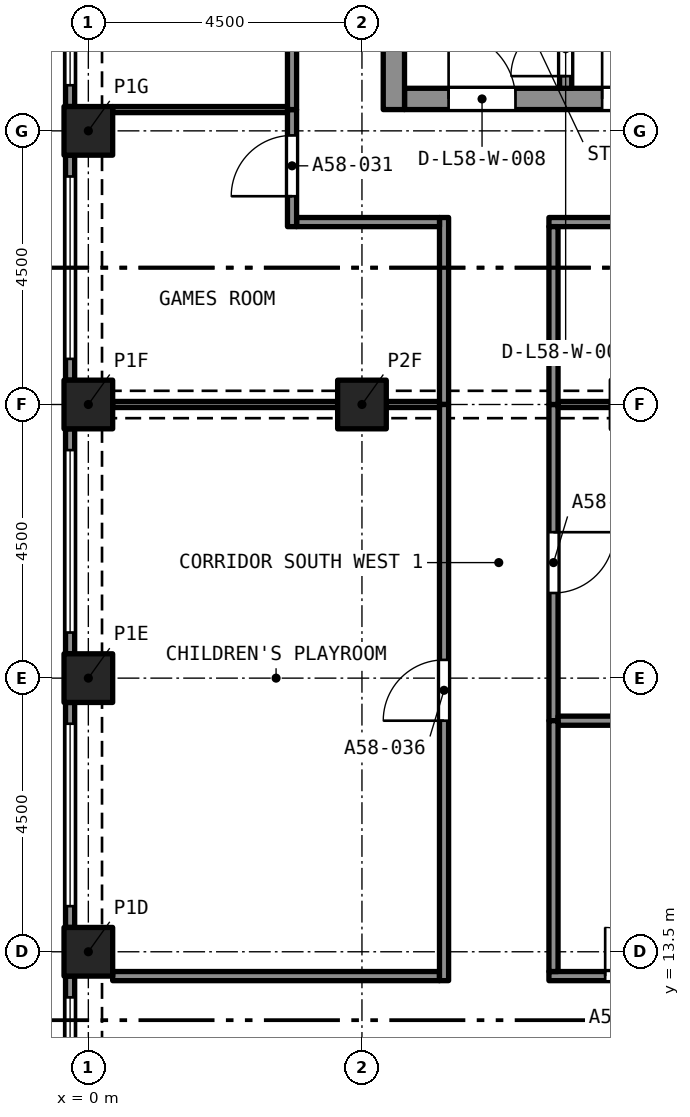
"""IFC4 building model, lengths in metres.
Left out: names, types, materials, properties, quantities, classifications, styles, units other than length and angle.
Written with IfcOpenShell. Run it as: python <this file> out.ifc"""

import sys

from ifc_helpers import new_model, si_unit, direction, frame, frame_2d, origin, origin_2d, place, context, subcontext, project, spatial, rectangle, extrude, element, fill, save


model = new_model("IFC4")
c1 = context("Model", 3, precision=1e-05, world=origin(), true_north=direction((0.0, 1.0)))
c2 = subcontext(c1, "Body", "Model", "MODEL_VIEW")
j1 = project(units=[si_unit("LENGTHUNIT", "METRE"), si_unit("PLANEANGLEUNIT", "RADIAN")], contexts=[c1])
p1 = place(None, origin())
s1 = spatial("IfcSite", under=j1, at=p1, CompositionType="ELEMENT")
p2 = place(p1, origin())
s2 = spatial("IfcBuilding", under=s1, at=p2, CompositionType="ELEMENT")
p3 = place(p2, frame((0.0, 0.0, 210.095)))
s3 = spatial("IfcBuildingStorey", under=s2, at=p3, CompositionType="ELEMENT", Elevation=210.095)
for number, where, z_axis, x_axis in (
    (1, (0.0, 13.5, 0.0), (0.0, 0.0, 1.0), (1.0, 0.0, 0.0)),
    (2, (0.0, 18.0, 0.0), (0.0, 0.0, 1.0), (1.0, 0.0, 0.0)),
    (3, (0.0, 22.5, 0.0), (0.0, 0.0, 1.0), (1.0, 0.0, 0.0)),
    (4, (4.5, 22.5, 0.0), (0.0, 0.0, 1.0), (1.0, 0.0, 0.0)),
    (5, (0.0, 27.0, 0.0), (0.0, 0.0, 1.0), (1.0, 0.0, 0.0)),
):
    element("IfcColumn", number, at=place(p3, frame(where, z_axis=z_axis, x_axis=x_axis)), inside=s3, PredefinedType="COLUMN", context=c2, shape_type="SweptSolid", body=[
        extrude(rectangle(XDim=0.8, YDim=0.8, at=origin_2d()), origin(), (0.0, 0.0, 1.0), 3.2),
    ])
p4 = place(p3, frame((5.2, 27.525, 0.0), z_axis=(0.0, 0.0, 1.0), x_axis=(1.0, 0.0, 0.0)))
e6 = element("IfcWall", 6, at=p4, inside=s3, PredefinedType="SOLIDWALL", context=c2, shape_type="SweptSolid", body=[
    extrude(rectangle(XDim=7.6, YDim=0.35, at=frame_2d((3.8, 0.0))), origin(), (0.0, 0.0, 1.0), 3.2),
])
p5 = place(p4, frame((0.725, 0.0, 0.0)))
e7 = element("IfcOpeningElement", 7, at=p5, cuts=e6, PredefinedType="OPENING", context=c2, shape_type="SweptSolid", body=[
    extrude(rectangle(XDim=1.1, YDim=2.1, at=frame_2d((0.55, 1.05))), frame((0.0, 0.185, 0.0), z_axis=(0.0, -1.0, 0.0), x_axis=(1.0, 0.0, 0.0)), (0.0, 0.0, 1.0), 0.37),
])
p6 = place(p4, frame((3.25, 0.0, 0.0)))
e8 = element("IfcOpeningElement", 8, at=p6, cuts=e6, PredefinedType="OPENING", context=c2, shape_type="SweptSolid", body=[
    extrude(rectangle(XDim=1.1, YDim=2.1, at=frame_2d((0.55, 1.05))), frame((0.0, 0.185, 0.0), z_axis=(0.0, -1.0, 0.0), x_axis=(1.0, 0.0, 0.0)), (0.0, 0.0, 1.0), 0.37),
])
p7 = place(p4, frame((5.775, 0.0, 0.0)))
e9 = element("IfcOpeningElement", 9, at=p7, cuts=e6, PredefinedType="OPENING", context=c2, shape_type="SweptSolid", body=[
    extrude(rectangle(XDim=1.1, YDim=2.1, at=frame_2d((0.55, 1.05))), frame((0.0, 0.185, 0.0), z_axis=(0.0, -1.0, 0.0), x_axis=(1.0, 0.0, 0.0)), (0.0, 0.0, 1.0), 0.37),
])
p8 = place(p3, frame((5.025, 27.35, 0.0), z_axis=(0.0, 0.0, 1.0), x_axis=(0.0, 1.0, 0.0)))
e10 = element("IfcWall", 10, at=p8, inside=s3, PredefinedType="SOLIDWALL", context=c2, shape_type="SweptSolid", body=[
    extrude(rectangle(XDim=12.8, YDim=0.35, at=frame_2d((6.4, 0.0))), origin(), (0.0, 0.0, 1.0), 3.2),
])
p9 = place(p8, frame((8.6, 0.0, 0.0)))
e11 = element("IfcOpeningElement", 11, at=p9, cuts=e10, PredefinedType="OPENING", context=c2, shape_type="SweptSolid", body=[
    extrude(rectangle(XDim=1.2, YDim=2.1, at=frame_2d((0.6, 1.05))), frame((0.0, 0.185, 0.0), z_axis=(0.0, -1.0, 0.0), x_axis=(1.0, 0.0, 0.0)), (0.0, 0.0, 1.0), 0.37),
])
p10 = place(p3, frame((-0.3, 27.4, 0.0), z_axis=(0.0, 0.0, 1.0), x_axis=(0.0, 1.0, 0.0)))
e12 = element("IfcWall", 12, at=p10, inside=s3, PredefinedType="SOLIDWALL", context=c2, shape_type="SweptSolid", body=[
    extrude(rectangle(XDim=3.7, YDim=0.15, at=frame_2d((1.85, 0.0))), origin(), (0.0, 0.0, 1.0), 3.2),
])
p11 = place(p10, frame((0.35, 0.0, 0.45)))
e13 = element("IfcOpeningElement", 13, at=p11, cuts=e12, PredefinedType="OPENING", context=c2, shape_type="SweptSolid", body=[
    extrude(rectangle(XDim=3.0, YDim=1.95, at=frame_2d((1.5, 0.975))), frame((0.0, 0.085, 0.0), z_axis=(0.0, -1.0, 0.0), x_axis=(1.0, 0.0, 0.0)), (0.0, 0.0, 1.0), 0.17),
])
p12 = place(p3, frame((-0.3, 22.9, 0.0), z_axis=(0.0, 0.0, 1.0), x_axis=(0.0, 1.0, 0.0)))
e14 = element("IfcWall", 14, at=p12, inside=s3, PredefinedType="SOLIDWALL", context=c2, shape_type="SweptSolid", body=[
    extrude(rectangle(XDim=3.7, YDim=0.15, at=frame_2d((1.85, 0.0))), origin(), (0.0, 0.0, 1.0), 3.2),
])
p13 = place(p12, frame((0.35, 0.0, 0.45)))
e15 = element("IfcOpeningElement", 15, at=p13, cuts=e14, PredefinedType="OPENING", context=c2, shape_type="SweptSolid", body=[
    extrude(rectangle(XDim=3.0, YDim=1.95, at=frame_2d((1.5, 0.975))), frame((0.0, 0.085, 0.0), z_axis=(0.0, -1.0, 0.0), x_axis=(1.0, 0.0, 0.0)), (0.0, 0.0, 1.0), 0.17),
])
p14 = place(p3, frame((-0.3, 18.4, 0.0), z_axis=(0.0, 0.0, 1.0), x_axis=(0.0, 1.0, 0.0)))
e16 = element("IfcWall", 16, at=p14, inside=s3, PredefinedType="SOLIDWALL", context=c2, shape_type="SweptSolid", body=[
    extrude(rectangle(XDim=3.7, YDim=0.15, at=frame_2d((1.85, 0.0))), origin(), (0.0, 0.0, 1.0), 3.2),
])
p15 = place(p14, frame((0.35, 0.0, 0.45)))
e17 = element("IfcOpeningElement", 17, at=p15, cuts=e16, PredefinedType="OPENING", context=c2, shape_type="SweptSolid", body=[
    extrude(rectangle(XDim=3.0, YDim=1.95, at=frame_2d((1.5, 0.975))), frame((0.0, 0.085, 0.0), z_axis=(0.0, -1.0, 0.0), x_axis=(1.0, 0.0, 0.0)), (0.0, 0.0, 1.0), 0.17),
])
p16 = place(p3, frame((-0.3, 13.9, 0.0), z_axis=(0.0, 0.0, 1.0), x_axis=(0.0, 1.0, 0.0)))
e18 = element("IfcWall", 18, at=p16, inside=s3, PredefinedType="SOLIDWALL", context=c2, shape_type="SweptSolid", body=[
    extrude(rectangle(XDim=3.7, YDim=0.15, at=frame_2d((1.85, 0.0))), origin(), (0.0, 0.0, 1.0), 3.2),
])
p17 = place(p16, frame((0.35, 0.0, 0.45)))
e19 = element("IfcOpeningElement", 19, at=p17, cuts=e18, PredefinedType="OPENING", context=c2, shape_type="SweptSolid", body=[
    extrude(rectangle(XDim=3.0, YDim=1.95, at=frame_2d((1.5, 0.975))), frame((0.0, 0.085, 0.0), z_axis=(0.0, -1.0, 0.0), x_axis=(1.0, 0.0, 0.0)), (0.0, 0.0, 1.0), 0.17),
])
p18 = place(p3, frame((-0.3, 9.4, 0.0), z_axis=(0.0, 0.0, 1.0), x_axis=(0.0, 1.0, 0.0)))
e20 = element("IfcWall", 20, at=p18, inside=s3, PredefinedType="SOLIDWALL", context=c2, shape_type="SweptSolid", body=[
    extrude(rectangle(XDim=3.7, YDim=0.15, at=frame_2d((1.85, 0.0))), origin(), (0.0, 0.0, 1.0), 3.2),
])
p19 = place(p18, frame((0.35, 0.0, 0.45)))
e21 = element("IfcOpeningElement", 21, at=p19, cuts=e20, PredefinedType="OPENING", context=c2, shape_type="SweptSolid", body=[
    extrude(rectangle(XDim=3.0, YDim=1.95, at=frame_2d((1.5, 0.975))), frame((0.0, 0.085, 0.0), z_axis=(0.0, -1.0, 0.0), x_axis=(1.0, 0.0, 0.0)), (0.0, 0.0, 1.0), 0.17),
])
p20 = place(p3, frame((7.65, 22.5, 0.0), z_axis=(0.0, 0.0, 1.0), x_axis=(0.0, -1.0, 0.0)))
e22 = element("IfcWall", 22, at=p20, inside=s3, PredefinedType="PARTITIONING", context=c2, shape_type="SweptSolid", body=[
    extrude(rectangle(XDim=5.2, YDim=0.15, at=frame_2d((2.6, 0.0))), origin(), (0.0, 0.0, 1.0), 2.9),
])
p21 = place(p20, frame((2.1, 0.0, 0.0)))
e23 = element("IfcOpeningElement", 23, at=p21, cuts=e22, PredefinedType="OPENING", context=c2, shape_type="SweptSolid", body=[
    extrude(rectangle(XDim=1.0, YDim=2.1, at=frame_2d((0.5, 1.05))), frame((0.0, 0.085, 0.0), z_axis=(0.0, -1.0, 0.0), x_axis=(1.0, 0.0, 0.0)), (0.0, 0.0, 1.0), 0.17),
])
p22 = place(p3, frame((7.725, 22.5, 0.0), z_axis=(0.0, 0.0, 1.0), x_axis=(1.0, 0.0, 0.0)))
e24 = element("IfcWall", 24, at=p22, inside=s3, PredefinedType="PARTITIONING", context=c2, shape_type="SweptSolid", body=[
    extrude(rectangle(XDim=0.875, YDim=0.1, at=frame_2d((0.438, 0.0))), origin(), (0.0, 0.0, 1.0), 2.38),
])
p23 = place(p3, frame((7.725, 17.3, 0.0), z_axis=(0.0, 0.0, 1.0), x_axis=(1.0, 0.0, 0.0)))
e25 = element("IfcWall", 25, at=p23, inside=s3, PredefinedType="PARTITIONING", context=c2, shape_type="SweptSolid", body=[
    extrude(rectangle(XDim=10.2, YDim=0.15, at=frame_2d((5.1, 0.0))), origin(), (0.0, 0.0, 1.0), 2.9),
])
p24 = place(p3, frame((7.575, 13.1, 0.0), z_axis=(0.0, 0.0, 1.0), x_axis=(1.0, 0.0, 0.0)))
e26 = element("IfcWall", 26, at=p24, inside=s3, PredefinedType="PARTITIONING", context=c2, shape_type="SweptSolid", body=[
    extrude(rectangle(XDim=2.575, YDim=0.15, at=frame_2d((1.288, 0.0))), origin(), (0.0, 0.0, 1.0), 2.9),
])
p25 = place(p24, frame((0.925, 0.0, 0.0)))
e27 = element("IfcOpeningElement", 27, at=p25, cuts=e26, PredefinedType="OPENING", context=c2, shape_type="SweptSolid", body=[
    extrude(rectangle(XDim=0.8, YDim=2.1, at=frame_2d((0.4, 1.05))), frame((0.0, 0.085, 0.0), z_axis=(0.0, -1.0, 0.0), x_axis=(1.0, 0.0, 0.0)), (0.0, 0.0, 1.0), 0.17),
])
p26 = place(p3, frame((0.4, 13.1, 0.0), z_axis=(0.0, 0.0, 1.0), x_axis=(1.0, 0.0, 0.0)))
e28 = element("IfcWall", 28, at=p26, inside=s3, PredefinedType="PARTITIONING", context=c2, shape_type="SweptSolid", body=[
    extrude(rectangle(XDim=5.375, YDim=0.15, at=frame_2d((2.688, 0.0))), origin(), (0.0, 0.0, 1.0), 2.9),
])
p27 = place(p3, frame((5.85, 22.5, 0.0), z_axis=(0.0, 0.0, 1.0), x_axis=(0.0, 1.0, 0.0)))
e29 = element("IfcWall", 29, at=p27, inside=s3, PredefinedType="PARTITIONING", context=c2, shape_type="SweptSolid", body=[
    extrude(rectangle(XDim=3.075, YDim=0.15, at=frame_2d((1.538, 0.0))), origin(), (0.0, 0.0, 1.0), 2.9),
])
p28 = place(p3, frame((3.425, 25.5, 0.0), z_axis=(0.0, 0.0, 1.0), x_axis=(1.0, 0.0, 0.0)))
e30 = element("IfcWall", 30, at=p28, inside=s3, PredefinedType="PARTITIONING", context=c2, shape_type="SweptSolid", body=[
    extrude(rectangle(XDim=2.35, YDim=0.15, at=frame_2d((1.175, 0.0))), origin(), (0.0, 0.0, 1.0), 2.9),
])
p29 = place(p3, frame((3.35, 25.425, 0.0), z_axis=(0.0, 0.0, 1.0), x_axis=(0.0, 1.0, 0.0)))
e31 = element("IfcWall", 31, at=p29, inside=s3, PredefinedType="PARTITIONING", context=c2, shape_type="SweptSolid", body=[
    extrude(rectangle(XDim=1.925, YDim=0.15, at=frame_2d((0.962, 0.0))), origin(), (0.0, 0.0, 1.0), 2.9),
])
p30 = place(p29, frame((0.5, 0.0, 0.0)))
e32 = element("IfcOpeningElement", 32, at=p30, cuts=e31, PredefinedType="OPENING", context=c2, shape_type="SweptSolid", body=[
    extrude(rectangle(XDim=1.0, YDim=2.1, at=frame_2d((0.5, 1.05))), frame((0.0, 0.085, 0.0), z_axis=(0.0, -1.0, 0.0), x_axis=(1.0, 0.0, 0.0)), (0.0, 0.0, 1.0), 0.17),
])
p31 = place(p3, frame((13.5, 25.5, 0.0), z_axis=(0.0, 0.0, 1.0), x_axis=(-1.0, 0.0, 0.0)))
e33 = element("IfcWall", 33, at=p31, inside=s3, PredefinedType="PARTITIONING", context=c2, shape_type="SweptSolid", body=[
    extrude(rectangle(XDim=5.925, YDim=0.15, at=frame_2d((2.962, 0.0))), origin(), (0.0, 0.0, 1.0), 2.9),
])
p32 = place(p31, frame((2.425, 0.0, 0.0)))
e34 = element("IfcOpeningElement", 34, at=p32, cuts=e33, PredefinedType="OPENING", context=c2, shape_type="SweptSolid", body=[
    extrude(rectangle(XDim=1.0, YDim=2.1, at=frame_2d((0.5, 1.05))), frame((0.0, 0.085, 0.0), z_axis=(0.0, -1.0, 0.0), x_axis=(1.0, 0.0, 0.0)), (0.0, 0.0, 1.0), 0.17),
])
p33 = place(p3, frame((7.65, 22.5, 0.0), z_axis=(0.0, 0.0, 1.0), x_axis=(0.0, 1.0, 0.0)))
e35 = element("IfcWall", 35, at=p33, inside=s3, PredefinedType="PARTITIONING", context=c2, shape_type="SweptSolid", body=[
    extrude(rectangle(XDim=2.925, YDim=0.15, at=frame_2d((1.462, 0.0))), origin(), (0.0, 0.0, 1.0), 2.9),
])
p34 = place(p3, frame((3.35, 27.35, 0.0), z_axis=(0.0, 0.0, 1.0), x_axis=(0.0, 1.0, 0.0)))
e36 = element("IfcWall", 36, at=p34, inside=s3, PredefinedType="PARTITIONING", context=c2, shape_type="SweptSolid", body=[
    extrude(rectangle(XDim=4.15, YDim=0.15, at=frame_2d((2.075, 0.0))), origin(), (0.0, 0.0, 1.0), 2.9),
])
p35 = place(p34, frame((1.575, 0.0, 0.0)))
e37 = element("IfcOpeningElement", 37, at=p35, cuts=e36, PredefinedType="OPENING", context=c2, shape_type="SweptSolid", body=[
    extrude(rectangle(XDim=1.0, YDim=2.1, at=frame_2d((0.5, 1.05))), frame((0.0, 0.085, 0.0), z_axis=(0.0, -1.0, 0.0), x_axis=(1.0, 0.0, 0.0)), (0.0, 0.0, 1.0), 0.17),
])
p36 = place(p3, frame((7.65, 13.175, 0.0), z_axis=(0.0, 0.0, 1.0), x_axis=(0.0, 1.0, 0.0)))
e38 = element("IfcWall", 38, at=p36, inside=s3, PredefinedType="PARTITIONING", context=c2, shape_type="SweptSolid", body=[
    extrude(rectangle(XDim=4.125, YDim=0.15, at=frame_2d((2.062, 0.0))), origin(), (0.0, 0.0, 1.0), 2.9),
])
p37 = place(p3, frame((5.85, 13.025, 0.0), z_axis=(0.0, 0.0, 1.0), x_axis=(0.0, 1.0, 0.0)))
e39 = element("IfcWall", 39, at=p37, inside=s3, PredefinedType="PARTITIONING", context=c2, shape_type="SweptSolid", body=[
    extrude(rectangle(XDim=9.475, YDim=0.15, at=frame_2d((4.738, 0.0))), origin(), (0.0, 0.0, 1.0), 2.9),
])
p38 = place(p37, frame((4.275, 0.0, 0.0)))
e40 = element("IfcOpeningElement", 40, at=p38, cuts=e39, PredefinedType="OPENING", context=c2, shape_type="SweptSolid", body=[
    extrude(rectangle(XDim=1.0, YDim=2.1, at=frame_2d((0.5, 1.05))), frame((0.0, 0.085, 0.0), z_axis=(0.0, -1.0, 0.0), x_axis=(1.0, 0.0, 0.0)), (0.0, 0.0, 1.0), 0.17),
])
p39 = place(p3, frame((0.4, 27.35, 0.0), z_axis=(0.0, 0.0, 1.0), x_axis=(1.0, 0.0, 0.0)))
e41 = element("IfcWall", 41, at=p39, inside=s3, PredefinedType="PARTITIONING", context=c2, shape_type="SweptSolid", body=[
    extrude(rectangle(XDim=2.875, YDim=0.1, at=frame_2d((1.438, 0.0))), origin(), (0.0, 0.0, 1.0), 2.9),
])
p40 = place(p3, frame((4.9, 22.5, 0.0), z_axis=(0.0, 0.0, 1.0), x_axis=(1.0, 0.0, 0.0)))
e42 = element("IfcWall", 42, at=p40, inside=s3, PredefinedType="PARTITIONING", context=c2, shape_type="SweptSolid", body=[
    extrude(rectangle(XDim=0.875, YDim=0.1, at=frame_2d((0.438, 0.0))), origin(), (0.0, 0.0, 1.0), 2.38),
])
p41 = place(p3, frame((0.4, 22.5, 0.0), z_axis=(0.0, 0.0, 1.0), x_axis=(1.0, 0.0, 0.0)))
e43 = element("IfcWall", 43, at=p41, inside=s3, PredefinedType="PARTITIONING", context=c2, shape_type="SweptSolid", body=[
    extrude(rectangle(XDim=3.7, YDim=0.1, at=frame_2d((1.85, 0.0))), origin(), (0.0, 0.0, 1.0), 2.38),
])
p42 = place(p3, frame((7.85, 27.7, 0.0), z_axis=(0.0, 0.0, 1.0), x_axis=(0.0, 1.0, 0.0)))
e44 = element("IfcWall", 44, at=p42, inside=s3, PredefinedType="SOLIDWALL", context=c2, shape_type="SweptSolid", body=[
    extrude(rectangle(XDim=5.4, YDim=0.2, at=frame_2d((2.7, 0.0))), origin(), (0.0, 0.0, 1.0), 2.9),
])
p43 = place(p42, frame((0.2, 0.0, 0.0)))
e45 = element("IfcOpeningElement", 45, at=p43, cuts=e44, PredefinedType="OPENING", context=c2, shape_type="SweptSolid", body=[
    extrude(rectangle(XDim=0.9, YDim=2.1, at=frame_2d((0.45, 1.05))), frame((0.0, 0.11, 0.0), z_axis=(0.0, -1.0, 0.0), x_axis=(1.0, 0.0, 0.0)), (0.0, 0.0, 1.0), 0.22),
])
p44 = place(p11, origin())
e46 = element("IfcWindow", 46, at=p44, inside=s3, PartitioningType="SINGLE_PANEL", PredefinedType="WINDOW", context=c2, shape_type="SweptSolid", body=[
    extrude(rectangle(XDim=3.0, YDim=1.95, at=frame_2d((1.5, 0.975))), frame((0.0, 0.03, 0.0), z_axis=(0.0, -1.0, 0.0), x_axis=(1.0, 0.0, 0.0)), (0.0, 0.0, 1.0), 0.06),
])
fill(e13, e46)
p45 = place(p13, origin())
e47 = element("IfcWindow", 47, at=p45, inside=s3, PartitioningType="SINGLE_PANEL", PredefinedType="WINDOW", context=c2, shape_type="SweptSolid", body=[
    extrude(rectangle(XDim=3.0, YDim=1.95, at=frame_2d((1.5, 0.975))), frame((0.0, 0.03, 0.0), z_axis=(0.0, -1.0, 0.0), x_axis=(1.0, 0.0, 0.0)), (0.0, 0.0, 1.0), 0.06),
])
fill(e15, e47)
p46 = place(p15, origin())
e48 = element("IfcWindow", 48, at=p46, inside=s3, PartitioningType="SINGLE_PANEL", PredefinedType="WINDOW", context=c2, shape_type="SweptSolid", body=[
    extrude(rectangle(XDim=3.0, YDim=1.95, at=frame_2d((1.5, 0.975))), frame((0.0, 0.03, 0.0), z_axis=(0.0, -1.0, 0.0), x_axis=(1.0, 0.0, 0.0)), (0.0, 0.0, 1.0), 0.06),
])
fill(e17, e48)
p47 = place(p17, origin())
e49 = element("IfcWindow", 49, at=p47, inside=s3, PartitioningType="SINGLE_PANEL", PredefinedType="WINDOW", context=c2, shape_type="SweptSolid", body=[
    extrude(rectangle(XDim=3.0, YDim=1.95, at=frame_2d((1.5, 0.975))), frame((0.0, 0.03, 0.0), z_axis=(0.0, -1.0, 0.0), x_axis=(1.0, 0.0, 0.0)), (0.0, 0.0, 1.0), 0.06),
])
fill(e19, e49)
p48 = place(p19, origin())
e50 = element("IfcWindow", 50, at=p48, inside=s3, PartitioningType="SINGLE_PANEL", PredefinedType="WINDOW", context=c2, shape_type="SweptSolid", body=[
    extrude(rectangle(XDim=3.0, YDim=1.95, at=frame_2d((1.5, 0.975))), frame((0.0, 0.03, 0.0), z_axis=(0.0, -1.0, 0.0), x_axis=(1.0, 0.0, 0.0)), (0.0, 0.0, 1.0), 0.06),
])
fill(e21, e50)
p49 = place(p21, origin())
e51 = element("IfcDoor", 51, at=p49, inside=s3, OperationType="SINGLE_SWING_RIGHT", PredefinedType="DOOR", context=c2, shape_type="SweptSolid", body=[
    extrude(rectangle(XDim=1.0, YDim=2.1, at=frame_2d((0.5, 1.05))), frame((0.0, 0.025, 0.0), z_axis=(0.0, -1.0, 0.0), x_axis=(1.0, 0.0, 0.0)), (0.0, 0.0, 1.0), 0.05),
])
fill(e23, e51)
p50 = place(p25, origin())
e52 = element("IfcDoor", 52, at=p50, inside=s3, OperationType="SINGLE_SWING_RIGHT", PredefinedType="DOOR", context=c2, shape_type="SweptSolid", body=[
    extrude(rectangle(XDim=0.8, YDim=2.1, at=frame_2d((0.4, 1.05))), frame((0.0, 0.025, 0.0), z_axis=(0.0, -1.0, 0.0), x_axis=(1.0, 0.0, 0.0)), (0.0, 0.0, 1.0), 0.05),
])
fill(e27, e52)
p51 = place(p30, origin())
e53 = element("IfcDoor", 53, at=p51, inside=s3, OperationType="SINGLE_SWING_RIGHT", PredefinedType="DOOR", context=c2, shape_type="SweptSolid", body=[
    extrude(rectangle(XDim=1.0, YDim=2.1, at=frame_2d((0.5, 1.05))), frame((0.0, 0.025, 0.0), z_axis=(0.0, -1.0, 0.0), x_axis=(1.0, 0.0, 0.0)), (0.0, 0.0, 1.0), 0.05),
])
fill(e32, e53)
p52 = place(p38, origin())
e54 = element("IfcDoor", 54, at=p52, inside=s3, OperationType="SINGLE_SWING_RIGHT", PredefinedType="DOOR", context=c2, shape_type="SweptSolid", body=[
    extrude(rectangle(XDim=1.0, YDim=2.1, at=frame_2d((0.5, 1.05))), frame((0.0, 0.025, 0.0), z_axis=(0.0, -1.0, 0.0), x_axis=(1.0, 0.0, 0.0)), (0.0, 0.0, 1.0), 0.05),
])
fill(e40, e54)
p53 = place(p43, origin())
e55 = element("IfcDoor", 55, at=p53, inside=s3, OperationType="SINGLE_SWING_LEFT", PredefinedType="DOOR", context=c2, shape_type="SweptSolid", body=[
    extrude(rectangle(XDim=0.9, YDim=2.1, at=frame_2d((0.45, 1.05))), frame((0.0, 0.025, 0.0), z_axis=(0.0, -1.0, 0.0), x_axis=(1.0, 0.0, 0.0)), (0.0, 0.0, 1.0), 0.05),
])
fill(e45, e55)
p54 = place(p5, origin())
e56 = element("IfcDoor", 56, at=p54, inside=s3, OperationType="SINGLE_SWING_LEFT", PredefinedType="DOOR", context=c2, shape_type="SweptSolid", body=[
    extrude(rectangle(XDim=1.1, YDim=2.1, at=frame_2d((0.55, 1.05))), frame((0.0, 0.025, 0.0), z_axis=(0.0, -1.0, 0.0), x_axis=(1.0, 0.0, 0.0)), (0.0, 0.0, 1.0), 0.05),
])
fill(e7, e56)
p55 = place(p6, origin())
e57 = element("IfcDoor", 57, at=p55, inside=s3, OperationType="SINGLE_SWING_LEFT", PredefinedType="DOOR", context=c2, shape_type="SweptSolid", body=[
    extrude(rectangle(XDim=1.1, YDim=2.1, at=frame_2d((0.55, 1.05))), frame((0.0, 0.025, 0.0), z_axis=(0.0, -1.0, 0.0), x_axis=(1.0, 0.0, 0.0)), (0.0, 0.0, 1.0), 0.05),
])
fill(e8, e57)
save(model, sys.argv[1])
